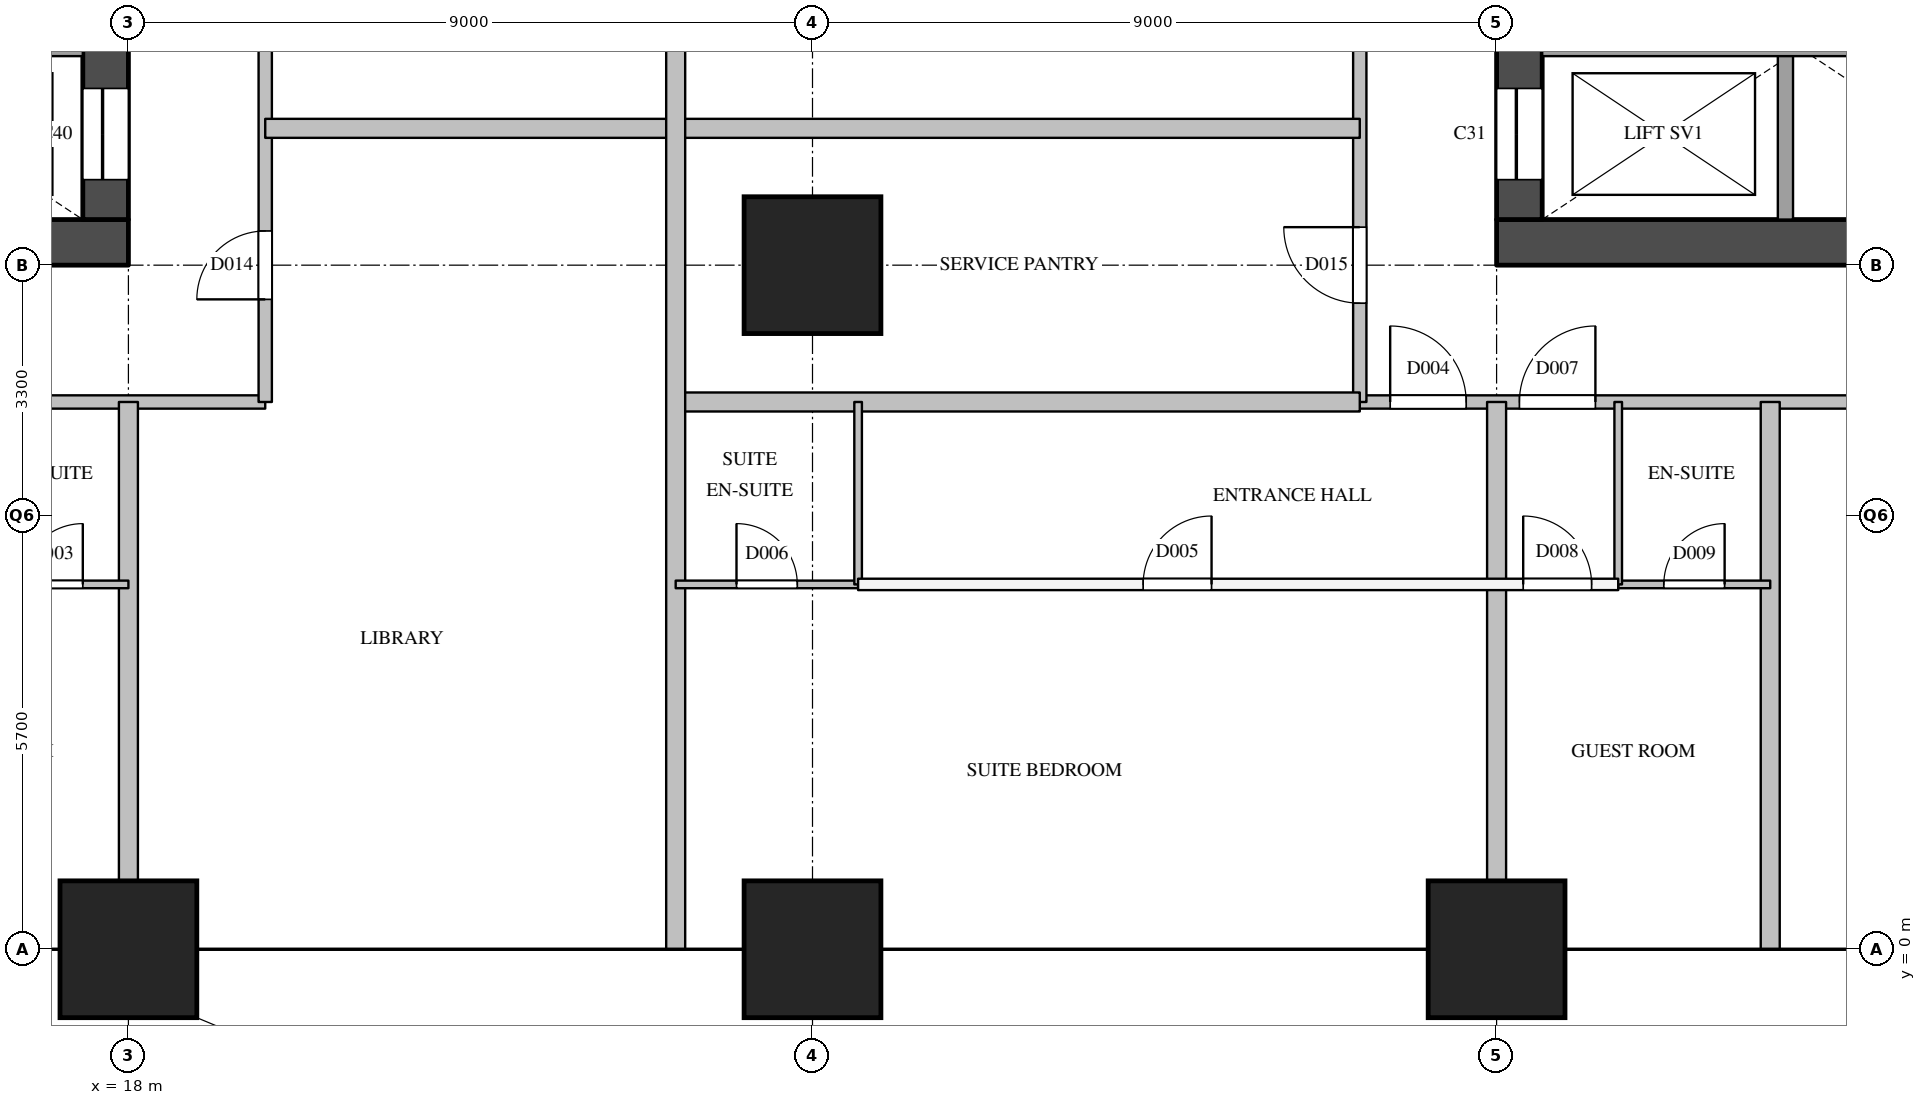
"""IFC4 building model, lengths in metres.
Left out: names, types, materials, properties, quantities, classifications, styles, units other than length and angle.
Written with IfcOpenShell. Run it as: python <this file> out.ifc"""

import sys

from ifc_helpers import new_model, si_unit, direction, frame, frame_2d, origin, origin_2d, place, context, subcontext, project, spatial, rectangle, extrude, element, fill, save


model = new_model("IFC4")
c1 = context("Model", 3, precision=1e-05, world=origin(), true_north=direction((0.0, 1.0)))
c2 = subcontext(c1, "Body", "Model", "MODEL_VIEW")
j1 = project(units=[si_unit("LENGTHUNIT", "METRE"), si_unit("PLANEANGLEUNIT", "RADIAN")], contexts=[c1])
p1 = place(None, origin())
s1 = spatial("IfcSite", under=j1, at=p1, CompositionType="ELEMENT")
p2 = place(p1, origin())
s2 = spatial("IfcBuilding", under=s1, at=p2, CompositionType="ELEMENT")
p3 = place(p2, frame((0.0, 0.0, 57.6)))
s3 = spatial("IfcBuildingStorey", under=s2, at=p3, CompositionType="ELEMENT", Elevation=57.6)
for number, where, z_axis, x_axis in (
    (1, (18.0, 0.0, 0.0), (0.0, 0.0, 1.0), (1.0, 0.0, 0.0)),
    (2, (27.0, 0.0, 0.0), (0.0, 0.0, 1.0), (1.0, 0.0, 0.0)),
    (3, (27.0, 9.0, 0.0), (0.0, 0.0, 1.0), (1.0, 0.0, 0.0)),
    (4, (36.0, 0.0, 0.0), (0.0, 0.0, 1.0), (1.0, 0.0, 0.0)),
):
    element("IfcColumn", number, at=place(p3, frame(where, z_axis=z_axis, x_axis=x_axis)), inside=s3, PredefinedType="COLUMN", context=c2, shape_type="SweptSolid", body=[
        extrude(rectangle(XDim=1.8, YDim=1.8, at=origin_2d()), origin(), (0.0, 0.0, 1.0), 3.8),
    ])
p4 = place(p3, frame((36.0, 9.3, 0.0), z_axis=(0.0, 0.0, 1.0), x_axis=(1.0, 0.0, 0.0)))
e5 = element("IfcWall", 5, at=p4, inside=s3, PredefinedType="SHEAR", context=c2, shape_type="SweptSolid", body=[
    extrude(rectangle(XDim=9.0, YDim=0.6, at=frame_2d((4.5, 0.0))), origin(), (0.0, 0.0, 1.0), 3.5),
])
p5 = place(p3, frame((36.3, 9.6, 0.0), z_axis=(0.0, 0.0, 1.0), x_axis=(0.0, 1.0, 0.0)))
e6 = element("IfcWall", 6, at=p5, inside=s3, PredefinedType="SHEAR", context=c2, shape_type="SweptSolid", body=[
    extrude(rectangle(XDim=12.3, YDim=0.6, at=frame_2d((6.15, 0.0))), origin(), (0.0, 0.0, 1.0), 3.5),
])
p6 = place(p5, frame((0.525, 0.0, 0.0)))
e7 = element("IfcOpeningElement", 7, at=p6, cuts=e6, PredefinedType="OPENING", context=c2, shape_type="SweptSolid", body=[
    extrude(rectangle(XDim=1.2, YDim=2.1, at=frame_2d((0.6, 1.05))), frame((0.0, 0.31, 0.0), z_axis=(0.0, -1.0, 0.0), x_axis=(1.0, 0.0, 0.0)), (0.0, 0.0, 1.0), 0.62),
])
p7 = place(p5, frame((4.8, 0.0, 0.0)))
e8 = element("IfcOpeningElement", 8, at=p7, cuts=e6, PredefinedType="OPENING", context=c2, shape_type="SweptSolid", body=[
    extrude(rectangle(XDim=1.0, YDim=2.1, at=frame_2d((0.5, 1.05))), frame((0.0, 0.31, 0.0), z_axis=(0.0, -1.0, 0.0), x_axis=(1.0, 0.0, 0.0)), (0.0, 0.0, 1.0), 0.62),
])
p8 = place(p3, frame((39.8, 9.6, 0.0), z_axis=(0.0, 0.0, 1.0), x_axis=(0.0, 1.0, 0.0)))
e9 = element("IfcWall", 9, at=p8, inside=s3, PredefinedType="SOLIDWALL", context=c2, shape_type="SweptSolid", body=[
    extrude(rectangle(XDim=2.3, YDim=0.2, at=frame_2d((1.15, 0.0))), origin(), (0.0, 0.0, 1.0), 3.5),
])
p9 = place(p3, frame((36.6, 11.85, 0.0), z_axis=(0.0, 0.0, 1.0), x_axis=(1.0, 0.0, 0.0)))
e10 = element("IfcWall", 10, at=p9, inside=s3, PredefinedType="SOLIDWALL", context=c2, shape_type="SweptSolid", body=[
    extrude(rectangle(XDim=7.8, YDim=0.2, at=frame_2d((3.9, 0.0))), origin(), (0.0, 0.0, 1.0), 3.5),
])
p10 = place(p3, frame((9.0, 9.3, 0.0), z_axis=(0.0, 0.0, 1.0), x_axis=(1.0, 0.0, 0.0)))
e11 = element("IfcWall", 11, at=p10, inside=s3, PredefinedType="SHEAR", context=c2, shape_type="SweptSolid", body=[
    extrude(rectangle(XDim=9.0, YDim=0.6, at=frame_2d((4.5, 0.0))), origin(), (0.0, 0.0, 1.0), 3.5),
])
p11 = place(p3, frame((17.7, 9.6, 0.0), z_axis=(0.0, 0.0, 1.0), x_axis=(0.0, 1.0, 0.0)))
e12 = element("IfcWall", 12, at=p11, inside=s3, PredefinedType="SHEAR", context=c2, shape_type="SweptSolid", body=[
    extrude(rectangle(XDim=12.3, YDim=0.6, at=frame_2d((6.15, 0.0))), origin(), (0.0, 0.0, 1.0), 3.5),
])
p12 = place(p11, frame((0.525, 0.0, 0.0)))
e13 = element("IfcOpeningElement", 13, at=p12, cuts=e12, PredefinedType="OPENING", context=c2, shape_type="SweptSolid", body=[
    extrude(rectangle(XDim=1.2, YDim=2.1, at=frame_2d((0.6, 1.05))), frame((0.0, 0.31, 0.0), z_axis=(0.0, -1.0, 0.0), x_axis=(1.0, 0.0, 0.0)), (0.0, 0.0, 1.0), 0.62),
])
p13 = place(p3, frame((9.6, 11.85, 0.0), z_axis=(0.0, 0.0, 1.0), x_axis=(1.0, 0.0, 0.0)))
e14 = element("IfcWall", 14, at=p13, inside=s3, PredefinedType="SOLIDWALL", context=c2, shape_type="SweptSolid", body=[
    extrude(rectangle(XDim=7.8, YDim=0.2, at=frame_2d((3.9, 0.0))), origin(), (0.0, 0.0, 1.0), 3.5),
])
p14 = place(p3, frame((7.2, 7.2, 0.0), z_axis=(0.0, 0.0, 1.0), x_axis=(1.0, 0.0, 0.0)))
e15 = element("IfcWall", 15, at=p14, inside=s3, PredefinedType="PARTITIONING", context=c2, shape_type="SweptSolid", body=[
    extrude(rectangle(XDim=12.6, YDim=0.175, at=frame_2d((6.3, 0.0))), origin(), (0.0, 0.0, 1.0), 3.5),
])
p15 = place(p14, frame((7.5, 0.0, 0.0)))
e16 = element("IfcOpeningElement", 16, at=p15, cuts=e15, PredefinedType="OPENING", context=c2, shape_type="SweptSolid", body=[
    extrude(rectangle(XDim=1.0, YDim=2.1, at=frame_2d((0.5, 1.05))), frame((0.0, 0.097, 0.0), z_axis=(0.0, -1.0, 0.0), x_axis=(1.0, 0.0, 0.0)), (0.0, 0.0, 1.0), 0.195),
])
p16 = place(p14, frame((1.9, 0.0, 0.0)))
e17 = element("IfcOpeningElement", 17, at=p16, cuts=e15, PredefinedType="OPENING", context=c2, shape_type="SweptSolid", body=[
    extrude(rectangle(XDim=1.0, YDim=2.1, at=frame_2d((0.5, 1.05))), frame((0.0, 0.097, 0.0), z_axis=(0.0, -1.0, 0.0), x_axis=(1.0, 0.0, 0.0)), (0.0, 0.0, 1.0), 0.195),
])
p17 = place(p3, frame((34.2, 7.2, 0.0), z_axis=(0.0, 0.0, 1.0), x_axis=(1.0, 0.0, 0.0)))
e18 = element("IfcWall", 18, at=p17, inside=s3, PredefinedType="PARTITIONING", context=c2, shape_type="SweptSolid", body=[
    extrude(rectangle(XDim=12.6, YDim=0.175, at=frame_2d((6.3, 0.0))), origin(), (0.0, 0.0, 1.0), 3.5),
])
p18 = place(p17, frame((0.4, 0.0, 0.0)))
e19 = element("IfcOpeningElement", 19, at=p18, cuts=e18, PredefinedType="OPENING", context=c2, shape_type="SweptSolid", body=[
    extrude(rectangle(XDim=1.0, YDim=2.1, at=frame_2d((0.5, 1.05))), frame((0.0, 0.097, 0.0), z_axis=(0.0, -1.0, 0.0), x_axis=(1.0, 0.0, 0.0)), (0.0, 0.0, 1.0), 0.195),
])
p19 = place(p17, frame((2.1, 0.0, 0.0)))
e20 = element("IfcOpeningElement", 20, at=p19, cuts=e18, PredefinedType="OPENING", context=c2, shape_type="SweptSolid", body=[
    extrude(rectangle(XDim=1.0, YDim=2.1, at=frame_2d((0.5, 1.05))), frame((0.0, 0.097, 0.0), z_axis=(0.0, -1.0, 0.0), x_axis=(1.0, 0.0, 0.0)), (0.0, 0.0, 1.0), 0.195),
])
p20 = place(p17, frame((8.55, 0.0, 0.0)))
e21 = element("IfcOpeningElement", 21, at=p20, cuts=e18, PredefinedType="OPENING", context=c2, shape_type="SweptSolid", body=[
    extrude(rectangle(XDim=0.9, YDim=2.1, at=frame_2d((0.45, 1.05))), frame((0.0, 0.097, 0.0), z_axis=(0.0, -1.0, 0.0), x_axis=(1.0, 0.0, 0.0)), (0.0, 0.0, 1.0), 0.195),
])
p21 = place(p3, frame((19.8, 7.2, 0.0), z_axis=(0.0, 0.0, 1.0), x_axis=(0.0, 1.0, 0.0)))
e22 = element("IfcWall", 22, at=p21, inside=s3, PredefinedType="PARTITIONING", context=c2, shape_type="SweptSolid", body=[
    extrude(rectangle(XDim=16.49, YDim=0.175, at=frame_2d((8.245, 0.0))), origin(), (0.0, 0.0, 1.0), 3.5),
])
p22 = place(p21, frame((1.35, 0.0, 0.0)))
e23 = element("IfcOpeningElement", 23, at=p22, cuts=e22, PredefinedType="OPENING", context=c2, shape_type="SweptSolid", body=[
    extrude(rectangle(XDim=0.9, YDim=2.1, at=frame_2d((0.45, 1.05))), frame((0.0, 0.097, 0.0), z_axis=(0.0, -1.0, 0.0), x_axis=(1.0, 0.0, 0.0)), (0.0, 0.0, 1.0), 0.195),
])
p23 = place(p21, frame((8.5, 0.0, 0.0)))
e24 = element("IfcOpeningElement", 24, at=p23, cuts=e22, PredefinedType="OPENING", context=c2, shape_type="SweptSolid", body=[
    extrude(rectangle(XDim=1.0, YDim=2.1, at=frame_2d((0.5, 1.05))), frame((0.0, 0.097, 0.0), z_axis=(0.0, -1.0, 0.0), x_axis=(1.0, 0.0, 0.0)), (0.0, 0.0, 1.0), 0.195),
])
p24 = place(p21, frame((14.995, 0.0, 0.0)))
e25 = element("IfcOpeningElement", 25, at=p24, cuts=e22, PredefinedType="OPENING", context=c2, shape_type="SweptSolid", body=[
    extrude(rectangle(XDim=0.9, YDim=2.1, at=frame_2d((0.45, 1.05))), frame((0.0, 0.097, 0.0), z_axis=(0.0, -1.0, 0.0), x_axis=(1.0, 0.0, 0.0)), (0.0, 0.0, 1.0), 0.195),
])
p25 = place(p3, frame((34.2, 7.2, 0.0), z_axis=(0.0, 0.0, 1.0), x_axis=(0.0, 1.0, 0.0)))
e26 = element("IfcWall", 26, at=p25, inside=s3, PredefinedType="PARTITIONING", context=c2, shape_type="SweptSolid", body=[
    extrude(rectangle(XDim=16.49, YDim=0.175, at=frame_2d((8.245, 0.0))), origin(), (0.0, 0.0, 1.0), 3.5),
])
p26 = place(p25, frame((1.3, 0.0, 0.0)))
e27 = element("IfcOpeningElement", 27, at=p26, cuts=e26, PredefinedType="OPENING", context=c2, shape_type="SweptSolid", body=[
    extrude(rectangle(XDim=1.0, YDim=2.1, at=frame_2d((0.5, 1.05))), frame((0.0, 0.097, 0.0), z_axis=(0.0, -1.0, 0.0), x_axis=(1.0, 0.0, 0.0)), (0.0, 0.0, 1.0), 0.195),
])
p27 = place(p25, frame((6.7, 0.0, 0.0)))
e28 = element("IfcOpeningElement", 28, at=p27, cuts=e26, PredefinedType="OPENING", context=c2, shape_type="SweptSolid", body=[
    extrude(rectangle(XDim=1.0, YDim=2.1, at=frame_2d((0.5, 1.05))), frame((0.0, 0.097, 0.0), z_axis=(0.0, -1.0, 0.0), x_axis=(1.0, 0.0, 0.0)), (0.0, 0.0, 1.0), 0.195),
])
p28 = place(p25, frame((12.1, 0.0, 0.0)))
e29 = element("IfcOpeningElement", 29, at=p28, cuts=e26, PredefinedType="OPENING", context=c2, shape_type="SweptSolid", body=[
    extrude(rectangle(XDim=1.0, YDim=2.1, at=frame_2d((0.5, 1.05))), frame((0.0, 0.097, 0.0), z_axis=(0.0, -1.0, 0.0), x_axis=(1.0, 0.0, 0.0)), (0.0, 0.0, 1.0), 0.195),
])
p29 = place(p3, frame((27.6, 4.8, 0.0), z_axis=(0.0, 0.0, 1.0), x_axis=(1.0, 0.0, 0.0)))
e30 = element("IfcWall", 30, at=p29, inside=s3, PredefinedType="PARTITIONING", context=c2, shape_type="SweptSolid", body=[
    extrude(rectangle(XDim=10.0, YDim=0.15, at=frame_2d((5.0, 0.0))), origin(), (0.0, 0.0, 1.0), 3.5),
])
p30 = place(p29, frame((3.75, 0.0, 0.0)))
e31 = element("IfcOpeningElement", 31, at=p30, cuts=e30, PredefinedType="OPENING", context=c2, shape_type="SweptSolid", body=[
    extrude(rectangle(XDim=0.9, YDim=2.1, at=frame_2d((0.45, 1.05))), frame((0.0, 0.085, 0.0), z_axis=(0.0, -1.0, 0.0), x_axis=(1.0, 0.0, 0.0)), (0.0, 0.0, 1.0), 0.17),
])
p31 = place(p29, frame((8.75, 0.0, 0.0)))
e32 = element("IfcOpeningElement", 32, at=p31, cuts=e30, PredefinedType="OPENING", context=c2, shape_type="SweptSolid", body=[
    extrude(rectangle(XDim=0.9, YDim=2.1, at=frame_2d((0.45, 1.05))), frame((0.0, 0.085, 0.0), z_axis=(0.0, -1.0, 0.0), x_axis=(1.0, 0.0, 0.0)), (0.0, 0.0, 1.0), 0.17),
])
p32 = place(p3, frame((25.2, 7.2, 0.0), z_axis=(0.0, 0.0, 1.0), x_axis=(1.0, 0.0, 0.0)))
e33 = element("IfcWall", 33, at=p32, inside=s3, PredefinedType="PARTITIONING", context=c2, shape_type="SweptSolid", body=[
    extrude(rectangle(XDim=9.0, YDim=0.25, at=frame_2d((4.5, 0.0))), origin(), (0.0, 0.0, 1.0), 2.5),
])
p33 = place(p3, frame((19.8, 10.8, 0.0), z_axis=(0.0, 0.0, 1.0), x_axis=(1.0, 0.0, 0.0)))
e34 = element("IfcWall", 34, at=p33, inside=s3, PredefinedType="PARTITIONING", context=c2, shape_type="SweptSolid", body=[
    extrude(rectangle(XDim=14.4, YDim=0.25, at=frame_2d((7.2, 0.0))), origin(), (0.0, 0.0, 1.0), 2.5),
])
p34 = place(p3, frame((18.0, 0.0, 0.0), z_axis=(0.0, 0.0, 1.0), x_axis=(0.0, 1.0, 0.0)))
e35 = element("IfcWall", 35, at=p34, inside=s3, PredefinedType="PARTITIONING", context=c2, shape_type="SweptSolid", body=[
    extrude(rectangle(XDim=7.2, YDim=0.25, at=frame_2d((3.6, 0.0))), origin(), (0.0, 0.0, 1.0), 3.5),
])
p35 = place(p3, frame((25.2, 0.0, 0.0), z_axis=(0.0, 0.0, 1.0), x_axis=(0.0, 1.0, 0.0)))
e36 = element("IfcWall", 36, at=p35, inside=s3, PredefinedType="PARTITIONING", context=c2, shape_type="SweptSolid", body=[
    extrude(rectangle(XDim=21.6, YDim=0.25, at=frame_2d((10.8, 0.0))), origin(), (0.0, 0.0, 1.0), 2.5),
])
p36 = place(p3, frame((36.0, 0.0, 0.0), z_axis=(0.0, 0.0, 1.0), x_axis=(0.0, 1.0, 0.0)))
e37 = element("IfcWall", 37, at=p36, inside=s3, PredefinedType="PARTITIONING", context=c2, shape_type="SweptSolid", body=[
    extrude(rectangle(XDim=7.2, YDim=0.25, at=frame_2d((3.6, 0.0))), origin(), (0.0, 0.0, 1.0), 3.5),
])
p37 = place(p3, frame((39.6, 0.0, 0.0), z_axis=(0.0, 0.0, 1.0), x_axis=(0.0, 1.0, 0.0)))
e38 = element("IfcWall", 38, at=p37, inside=s3, PredefinedType="PARTITIONING", context=c2, shape_type="SweptSolid", body=[
    extrude(rectangle(XDim=7.2, YDim=0.25, at=frame_2d((3.6, 0.0))), origin(), (0.0, 0.0, 1.0), 2.5),
])
p38 = place(p3, frame((16.0, 4.8, 0.0), z_axis=(0.0, 0.0, 1.0), x_axis=(1.0, 0.0, 0.0)))
e39 = element("IfcWall", 39, at=p38, inside=s3, PredefinedType="PARTITIONING", context=c2, shape_type="SweptSolid", body=[
    extrude(rectangle(XDim=2.0, YDim=0.1, at=frame_2d((1.0, 0.0))), origin(), (0.0, 0.0, 1.0), 3.5),
])
p39 = place(p38, frame((0.6, 0.0, 0.0)))
e40 = element("IfcOpeningElement", 40, at=p39, cuts=e39, PredefinedType="OPENING", context=c2, shape_type="SweptSolid", body=[
    extrude(rectangle(XDim=0.8, YDim=2.1, at=frame_2d((0.4, 1.05))), frame((0.0, 0.06, 0.0), z_axis=(0.0, -1.0, 0.0), x_axis=(1.0, 0.0, 0.0)), (0.0, 0.0, 1.0), 0.12),
])
p40 = place(p3, frame((25.2, 4.8, 0.0), z_axis=(0.0, 0.0, 1.0), x_axis=(1.0, 0.0, 0.0)))
e41 = element("IfcWall", 41, at=p40, inside=s3, PredefinedType="PARTITIONING", context=c2, shape_type="SweptSolid", body=[
    extrude(rectangle(XDim=2.4, YDim=0.1, at=frame_2d((1.2, 0.0))), origin(), (0.0, 0.0, 1.0), 2.5),
])
p41 = place(p40, frame((0.8, 0.0, 0.0)))
e42 = element("IfcOpeningElement", 42, at=p41, cuts=e41, PredefinedType="OPENING", context=c2, shape_type="SweptSolid", body=[
    extrude(rectangle(XDim=0.8, YDim=2.1, at=frame_2d((0.4, 1.05))), frame((0.0, 0.06, 0.0), z_axis=(0.0, -1.0, 0.0), x_axis=(1.0, 0.0, 0.0)), (0.0, 0.0, 1.0), 0.12),
])
p42 = place(p3, frame((37.6, 4.8, 0.0), z_axis=(0.0, 0.0, 1.0), x_axis=(1.0, 0.0, 0.0)))
e43 = element("IfcWall", 43, at=p42, inside=s3, PredefinedType="PARTITIONING", context=c2, shape_type="SweptSolid", body=[
    extrude(rectangle(XDim=2.0, YDim=0.1, at=frame_2d((1.0, 0.0))), origin(), (0.0, 0.0, 1.0), 3.5),
])
p43 = place(p42, frame((0.6, 0.0, 0.0)))
e44 = element("IfcOpeningElement", 44, at=p43, cuts=e43, PredefinedType="OPENING", context=c2, shape_type="SweptSolid", body=[
    extrude(rectangle(XDim=0.8, YDim=2.1, at=frame_2d((0.4, 1.05))), frame((0.0, 0.06, 0.0), z_axis=(0.0, -1.0, 0.0), x_axis=(1.0, 0.0, 0.0)), (0.0, 0.0, 1.0), 0.12),
])
for number, where, z_axis, x_axis in (
    (45, (27.6, 4.8, 0.0), (0.0, 0.0, 1.0), (0.0, 1.0, 0.0)),
    (46, (37.6, 4.8, 0.0), (0.0, 0.0, 1.0), (0.0, 1.0, 0.0)),
):
    element("IfcWall", number, at=place(p3, frame(where, z_axis=z_axis, x_axis=x_axis)), inside=s3, PredefinedType="PARTITIONING", context=c2, shape_type="SweptSolid", body=[
        extrude(rectangle(XDim=2.4, YDim=0.1, at=frame_2d((1.2, 0.0))), origin(), (0.0, 0.0, 1.0), 3.5),
    ])
p44 = place(p6, origin())
e47 = element("IfcDoor", 47, at=p44, inside=s3, OperationType="SLIDING_TO_LEFT", PredefinedType="DOOR", context=c2, shape_type="SweptSolid", body=[
    extrude(rectangle(XDim=1.2, YDim=2.1, at=frame_2d((0.6, 1.05))), frame((0.0, 0.025, 0.0), z_axis=(0.0, -1.0, 0.0), x_axis=(1.0, 0.0, 0.0)), (0.0, 0.0, 1.0), 0.05),
])
fill(e7, e47)
p45 = place(p12, origin())
e48 = element("IfcDoor", 48, at=p45, inside=s3, OperationType="SLIDING_TO_LEFT", PredefinedType="DOOR", context=c2, shape_type="SweptSolid", body=[
    extrude(rectangle(XDim=1.2, YDim=2.1, at=frame_2d((0.6, 1.05))), frame((0.0, 0.025, 0.0), z_axis=(0.0, -1.0, 0.0), x_axis=(1.0, 0.0, 0.0)), (0.0, 0.0, 1.0), 0.05),
])
fill(e13, e48)
p46 = place(p39, origin())
e49 = element("IfcDoor", 49, at=p46, inside=s3, OperationType="SINGLE_SWING_RIGHT", PredefinedType="DOOR", context=c2, shape_type="SweptSolid", body=[
    extrude(rectangle(XDim=0.8, YDim=2.1, at=frame_2d((0.4, 1.05))), frame((0.0, 0.025, 0.0), z_axis=(0.0, -1.0, 0.0), x_axis=(1.0, 0.0, 0.0)), (0.0, 0.0, 1.0), 0.05),
])
fill(e40, e49)
p47 = place(p18, origin())
e50 = element("IfcDoor", 50, at=p47, inside=s3, OperationType="SINGLE_SWING_LEFT", PredefinedType="DOOR", context=c2, shape_type="SweptSolid", body=[
    extrude(rectangle(XDim=1.0, YDim=2.1, at=frame_2d((0.5, 1.05))), frame((0.0, 0.025, 0.0), z_axis=(0.0, -1.0, 0.0), x_axis=(1.0, 0.0, 0.0)), (0.0, 0.0, 1.0), 0.05),
])
fill(e19, e50)
p48 = place(p30, origin())
e51 = element("IfcDoor", 51, at=p48, inside=s3, OperationType="SINGLE_SWING_RIGHT", PredefinedType="DOOR", context=c2, shape_type="SweptSolid", body=[
    extrude(rectangle(XDim=0.9, YDim=2.1, at=frame_2d((0.45, 1.05))), frame((0.0, 0.025, 0.0), z_axis=(0.0, -1.0, 0.0), x_axis=(1.0, 0.0, 0.0)), (0.0, 0.0, 1.0), 0.05),
])
fill(e31, e51)
p49 = place(p41, origin())
e52 = element("IfcDoor", 52, at=p49, inside=s3, OperationType="SINGLE_SWING_LEFT", PredefinedType="DOOR", context=c2, shape_type="SweptSolid", body=[
    extrude(rectangle(XDim=0.8, YDim=2.1, at=frame_2d((0.4, 1.05))), frame((0.0, 0.025, 0.0), z_axis=(0.0, -1.0, 0.0), x_axis=(1.0, 0.0, 0.0)), (0.0, 0.0, 1.0), 0.05),
])
fill(e42, e52)
p50 = place(p19, origin())
e53 = element("IfcDoor", 53, at=p50, inside=s3, OperationType="SINGLE_SWING_RIGHT", PredefinedType="DOOR", context=c2, shape_type="SweptSolid", body=[
    extrude(rectangle(XDim=1.0, YDim=2.1, at=frame_2d((0.5, 1.05))), frame((0.0, 0.025, 0.0), z_axis=(0.0, -1.0, 0.0), x_axis=(1.0, 0.0, 0.0)), (0.0, 0.0, 1.0), 0.05),
])
fill(e20, e53)
p51 = place(p31, origin())
e54 = element("IfcDoor", 54, at=p51, inside=s3, OperationType="SINGLE_SWING_LEFT", PredefinedType="DOOR", context=c2, shape_type="SweptSolid", body=[
    extrude(rectangle(XDim=0.9, YDim=2.1, at=frame_2d((0.45, 1.05))), frame((0.0, 0.025, 0.0), z_axis=(0.0, -1.0, 0.0), x_axis=(1.0, 0.0, 0.0)), (0.0, 0.0, 1.0), 0.05),
])
fill(e32, e54)
p52 = place(p43, origin())
e55 = element("IfcDoor", 55, at=p52, inside=s3, OperationType="SINGLE_SWING_RIGHT", PredefinedType="DOOR", context=c2, shape_type="SweptSolid", body=[
    extrude(rectangle(XDim=0.8, YDim=2.1, at=frame_2d((0.4, 1.05))), frame((0.0, 0.025, 0.0), z_axis=(0.0, -1.0, 0.0), x_axis=(1.0, 0.0, 0.0)), (0.0, 0.0, 1.0), 0.05),
])
fill(e44, e55)
p53 = place(p22, origin())
e56 = element("IfcDoor", 56, at=p53, inside=s3, OperationType="SINGLE_SWING_LEFT", PredefinedType="DOOR", context=c2, shape_type="SweptSolid", body=[
    extrude(rectangle(XDim=0.9, YDim=2.1, at=frame_2d((0.45, 1.05))), frame((0.0, 0.025, 0.0), z_axis=(0.0, -1.0, 0.0), x_axis=(1.0, 0.0, 0.0)), (0.0, 0.0, 1.0), 0.05),
])
fill(e23, e56)
p54 = place(p26, origin())
e57 = element("IfcDoor", 57, at=p54, inside=s3, OperationType="SINGLE_SWING_RIGHT", PredefinedType="DOOR", context=c2, shape_type="SweptSolid", body=[
    extrude(rectangle(XDim=1.0, YDim=2.1, at=frame_2d((0.5, 1.05))), frame((0.0, 0.025, 0.0), z_axis=(0.0, -1.0, 0.0), x_axis=(1.0, 0.0, 0.0)), (0.0, 0.0, 1.0), 0.05),
])
fill(e27, e57)
save(model, sys.argv[1])
